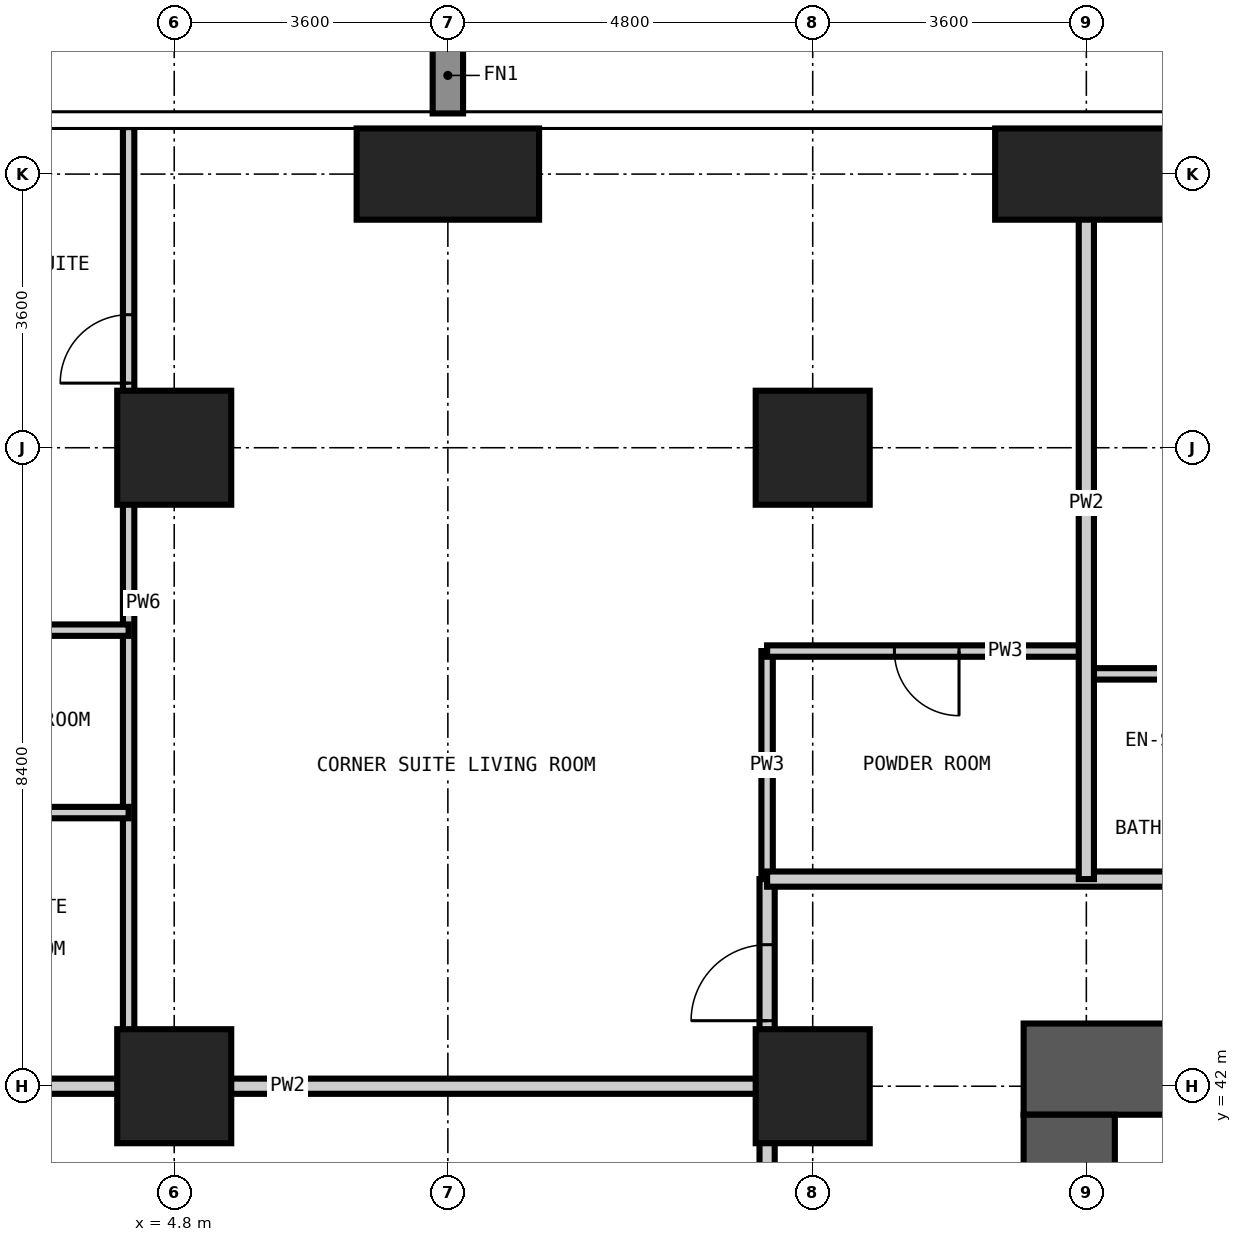
"""IFC4 building model, lengths in metres.
Left out: names, types, materials, properties, quantities, classifications, styles, units other than length and angle.
Written with IfcOpenShell. Run it as: python <this file> out.ifc"""

import sys

from ifc_helpers import new_model, si_unit, direction, frame, frame_2d, origin, origin_2d, place, context, subcontext, project, spatial, rectangle, extrude, element, fill, save


model = new_model("IFC4")
c1 = context("Model", 3, precision=1e-05, world=origin(), true_north=direction((0.0, 1.0)))
c2 = subcontext(c1, "Body", "Model", "MODEL_VIEW")
j1 = project(units=[si_unit("LENGTHUNIT", "METRE"), si_unit("PLANEANGLEUNIT", "RADIAN")], contexts=[c1])
p1 = place(None, origin())
s1 = spatial("IfcSite", under=j1, at=p1, CompositionType="ELEMENT")
p2 = place(p1, origin())
s2 = spatial("IfcBuilding", under=s1, at=p2, CompositionType="ELEMENT")
p3 = place(p2, frame((0.0, 0.0, 111.6)))
s3 = spatial("IfcBuildingStorey", under=s2, at=p3, CompositionType="ELEMENT", Elevation=111.6)
for number, where, z_axis, x_axis in (
    (1, (4.8, 42.0, -0.35), (0.0, 0.0, 1.0), (1.0, 0.0, 0.0)),
    (2, (4.8, 50.4, -0.35), (0.0, 0.0, 1.0), (1.0, 0.0, 0.0)),
):
    element("IfcColumn", number, at=place(p3, frame(where, z_axis=z_axis, x_axis=x_axis)), inside=s3, PredefinedType="COLUMN", context=c2, shape_type="SweptSolid", body=[
        extrude(rectangle(XDim=1.5, YDim=1.5, at=origin_2d()), origin(), (0.0, 0.0, 1.0), 3.6),
    ])
p4 = place(p3, frame((8.4, 54.0, -0.35), z_axis=(0.0, 0.0, 1.0), x_axis=(1.0, 0.0, 0.0)))
e3 = element("IfcColumn", 3, at=p4, inside=s3, PredefinedType="COLUMN", context=c2, shape_type="SweptSolid", body=[
    extrude(rectangle(XDim=2.4, YDim=1.2, at=origin_2d()), origin(), (0.0, 0.0, 1.0), 3.6),
])
for number, where, z_axis, x_axis in (
    (4, (13.2, 42.0, -0.35), (0.0, 0.0, 1.0), (1.0, 0.0, 0.0)),
    (5, (13.2, 50.4, -0.35), (0.0, 0.0, 1.0), (1.0, 0.0, 0.0)),
):
    element("IfcColumn", number, at=place(p3, frame(where, z_axis=z_axis, x_axis=x_axis)), inside=s3, PredefinedType="COLUMN", context=c2, shape_type="SweptSolid", body=[
        extrude(rectangle(XDim=1.5, YDim=1.5, at=origin_2d()), origin(), (0.0, 0.0, 1.0), 3.6),
    ])
p5 = place(p3, frame((16.8, 54.0, -0.35), z_axis=(0.0, 0.0, 1.0), x_axis=(1.0, 0.0, 0.0)))
e6 = element("IfcColumn", 6, at=p5, inside=s3, PredefinedType="COLUMN", context=c2, shape_type="SweptSolid", body=[
    extrude(rectangle(XDim=2.4, YDim=1.2, at=origin_2d()), origin(), (0.0, 0.0, 1.0), 3.6),
])
p6 = place(p3, frame((42.825, 42.225, -0.35), z_axis=(0.0, 0.0, 1.0), x_axis=(-1.0, 0.0, 0.0)))
e7 = element("IfcWall", 7, at=p6, inside=s3, PredefinedType="SHEAR", context=c2, shape_type="SweptSolid", body=[
    extrude(rectangle(XDim=26.85, YDim=1.2, at=frame_2d((13.425, 0.0))), origin(), (0.0, 0.0, 1.0), 3.6),
])
p7 = place(p6, frame((21.325, 0.0, 0.35)))
e8 = element("IfcOpeningElement", 8, at=p7, cuts=e7, PredefinedType="OPENING", context=c2, shape_type="SweptSolid", body=[
    extrude(rectangle(XDim=1.0, YDim=2.1, at=frame_2d((0.5, 1.05))), frame((0.0, 0.61, 0.0), z_axis=(0.0, -1.0, 0.0), x_axis=(1.0, 0.0, 0.0)), (0.0, 0.0, 1.0), 1.22),
])
p8 = place(p6, frame((10.725, 0.0, 0.35)))
e9 = element("IfcOpeningElement", 9, at=p8, cuts=e7, PredefinedType="OPENING", context=c2, shape_type="SweptSolid", body=[
    extrude(rectangle(XDim=1.2, YDim=2.2, at=frame_2d((0.6, 1.1))), frame((0.0, 0.61, 0.0), z_axis=(0.0, -1.0, 0.0), x_axis=(1.0, 0.0, 0.0)), (0.0, 0.0, 1.0), 1.22),
])
p9 = place(p3, frame((16.575, 41.625, -0.35), z_axis=(0.0, 0.0, 1.0), x_axis=(0.0, -1.0, 0.0)))
e10 = element("IfcWall", 10, at=p9, inside=s3, PredefinedType="SHEAR", context=c2, shape_type="SweptSolid", body=[
    extrude(rectangle(XDim=24.45, YDim=1.2, at=frame_2d((12.225, 0.0))), origin(), (0.0, 0.0, 1.0), 3.6),
])
p10 = place(p9, frame((11.325, 0.0, 0.35)))
e11 = element("IfcOpeningElement", 11, at=p10, cuts=e10, PredefinedType="OPENING", context=c2, shape_type="SweptSolid", body=[
    extrude(rectangle(XDim=1.8, YDim=2.2, at=frame_2d((0.9, 1.1))), frame((0.0, 0.61, 0.0), z_axis=(0.0, -1.0, 0.0), x_axis=(1.0, 0.0, 0.0)), (0.0, 0.0, 1.0), 1.22),
])
p11 = place(p9, frame((20.125, 0.0, 0.35)))
e12 = element("IfcOpeningElement", 12, at=p11, cuts=e10, PredefinedType="OPENING", context=c2, shape_type="SweptSolid", body=[
    extrude(rectangle(XDim=1.0, YDim=2.1, at=frame_2d((0.5, 1.05))), frame((0.0, 0.61, 0.0), z_axis=(0.0, -1.0, 0.0), x_axis=(1.0, 0.0, 0.0)), (0.0, 0.0, 1.0), 1.22),
])
p12 = place(p9, frame((5.425, 0.0, 0.35)))
e13 = element("IfcOpeningElement", 13, at=p12, cuts=e10, PredefinedType="OPENING", context=c2, shape_type="SweptSolid", body=[
    extrude(rectangle(XDim=1.0, YDim=2.1, at=frame_2d((0.5, 1.05))), frame((0.0, 0.61, 0.0), z_axis=(0.0, -1.0, 0.0), x_axis=(1.0, 0.0, 0.0)), (0.0, 0.0, 1.0), 1.22),
])
p13 = place(p3, frame((12.6, 44.725, 0.0), z_axis=(0.0, 0.0, 1.0), x_axis=(0.0, 1.0, 0.0)))
e14 = element("IfcWall", 14, at=p13, inside=s3, PredefinedType="PARTITIONING", context=c2, shape_type="SweptSolid", body=[
    extrude(rectangle(XDim=3.0, YDim=0.15, at=frame_2d((1.5, 0.0))), origin(), (0.0, 0.0, 1.0), 3.25),
])
p14 = place(p3, frame((16.8, 47.425, 0.0), z_axis=(0.0, 0.0, 1.0), x_axis=(1.0, 0.0, 0.0)))
e15 = element("IfcWall", 15, at=p14, inside=s3, PredefinedType="PARTITIONING", context=c2, shape_type="SweptSolid", body=[
    extrude(rectangle(XDim=2.4, YDim=0.15, at=frame_2d((1.2, 0.0))), origin(), (0.0, 0.0, 1.0), 3.25),
])
p15 = place(p3, frame((12.6, 47.725, 0.0), z_axis=(0.0, 0.0, 1.0), x_axis=(1.0, 0.0, 0.0)))
e16 = element("IfcWall", 16, at=p15, inside=s3, PredefinedType="PARTITIONING", context=c2, shape_type="SweptSolid", body=[
    extrude(rectangle(XDim=4.2, YDim=0.15, at=frame_2d((2.1, 0.0))), origin(), (0.0, 0.0, 1.0), 3.25),
])
p16 = place(p15, frame((1.675, 0.0, 0.0)))
e17 = element("IfcOpeningElement", 17, at=p16, cuts=e16, PredefinedType="OPENING", context=c2, shape_type="SweptSolid", body=[
    extrude(rectangle(XDim=0.85, YDim=2.1, at=frame_2d((0.425, 1.05))), frame((0.0, 0.085, 0.0), z_axis=(0.0, -1.0, 0.0), x_axis=(1.0, 0.0, 0.0)), (0.0, 0.0, 1.0), 0.17),
])
p17 = place(p3, frame((12.6, 12.875, 0.0), z_axis=(0.0, 0.0, 1.0), x_axis=(0.0, 1.0, 0.0)))
e18 = element("IfcWall", 18, at=p17, inside=s3, PredefinedType="PARTITIONING", context=c2, shape_type="SweptSolid", body=[
    extrude(rectangle(XDim=31.85, YDim=0.2, at=frame_2d((15.925, 0.0))), origin(), (0.0, 0.0, 1.0), 3.25),
])
p18 = place(p17, frame((8.825, 0.0, 0.0)))
e19 = element("IfcOpeningElement", 19, at=p18, cuts=e18, PredefinedType="OPENING", context=c2, shape_type="SweptSolid", body=[
    extrude(rectangle(XDim=1.0, YDim=2.2, at=frame_2d((0.5, 1.1))), frame((0.0, 0.11, 0.0), z_axis=(0.0, -1.0, 0.0), x_axis=(1.0, 0.0, 0.0)), (0.0, 0.0, 1.0), 0.22),
])
p19 = place(p17, frame((17.225, 0.0, 0.0)))
e20 = element("IfcOpeningElement", 20, at=p19, cuts=e18, PredefinedType="OPENING", context=c2, shape_type="SweptSolid", body=[
    extrude(rectangle(XDim=1.0, YDim=2.2, at=frame_2d((0.5, 1.1))), frame((0.0, 0.11, 0.0), z_axis=(0.0, -1.0, 0.0), x_axis=(1.0, 0.0, 0.0)), (0.0, 0.0, 1.0), 0.22),
])
p20 = place(p17, frame((25.625, 0.0, 0.0)))
e21 = element("IfcOpeningElement", 21, at=p20, cuts=e18, PredefinedType="OPENING", context=c2, shape_type="SweptSolid", body=[
    extrude(rectangle(XDim=1.0, YDim=2.2, at=frame_2d((0.5, 1.1))), frame((0.0, 0.11, 0.0), z_axis=(0.0, -1.0, 0.0), x_axis=(1.0, 0.0, 0.0)), (0.0, 0.0, 1.0), 0.22),
])
p21 = place(p17, frame((1.463, 0.0, 0.0)))
e22 = element("IfcOpeningElement", 22, at=p21, cuts=e18, PredefinedType="OPENING", context=c2, shape_type="SweptSolid", body=[
    extrude(rectangle(XDim=1.0, YDim=2.2, at=frame_2d((0.5, 1.1))), frame((0.0, 0.11, 0.0), z_axis=(0.0, -1.0, 0.0), x_axis=(1.0, 0.0, 0.0)), (0.0, 0.0, 1.0), 0.22),
])
p22 = place(p17, frame((29.987, 0.0, 0.0)))
e23 = element("IfcOpeningElement", 23, at=p22, cuts=e18, PredefinedType="OPENING", context=c2, shape_type="SweptSolid", body=[
    extrude(rectangle(XDim=1.0, YDim=2.2, at=frame_2d((0.5, 1.1))), frame((0.0, 0.11, 0.0), z_axis=(0.0, -1.0, 0.0), x_axis=(1.0, 0.0, 0.0)), (0.0, 0.0, 1.0), 0.22),
])
p23 = place(p3, frame((12.6, 44.725, 0.0), z_axis=(0.0, 0.0, 1.0), x_axis=(1.0, 0.0, 0.0)))
e24 = element("IfcWall", 24, at=p23, inside=s3, PredefinedType="PARTITIONING", context=c2, shape_type="SweptSolid", body=[
    extrude(rectangle(XDim=32.725, YDim=0.2, at=frame_2d((16.362, 0.0))), origin(), (0.0, 0.0, 1.0), 3.25),
])
p24 = place(p23, frame((9.1, 0.0, 0.0)))
e25 = element("IfcOpeningElement", 25, at=p24, cuts=e24, PredefinedType="OPENING", context=c2, shape_type="SweptSolid", body=[
    extrude(rectangle(XDim=1.0, YDim=2.2, at=frame_2d((0.5, 1.1))), frame((0.0, 0.11, 0.0), z_axis=(0.0, -1.0, 0.0), x_axis=(1.0, 0.0, 0.0)), (0.0, 0.0, 1.0), 0.22),
])
p25 = place(p23, frame((17.5, 0.0, 0.0)))
e26 = element("IfcOpeningElement", 26, at=p25, cuts=e24, PredefinedType="OPENING", context=c2, shape_type="SweptSolid", body=[
    extrude(rectangle(XDim=1.0, YDim=2.2, at=frame_2d((0.5, 1.1))), frame((0.0, 0.11, 0.0), z_axis=(0.0, -1.0, 0.0), x_axis=(1.0, 0.0, 0.0)), (0.0, 0.0, 1.0), 0.22),
])
p26 = place(p23, frame((25.9, 0.0, 0.0)))
e27 = element("IfcOpeningElement", 27, at=p26, cuts=e24, PredefinedType="OPENING", context=c2, shape_type="SweptSolid", body=[
    extrude(rectangle(XDim=1.0, YDim=2.2, at=frame_2d((0.5, 1.1))), frame((0.0, 0.11, 0.0), z_axis=(0.0, -1.0, 0.0), x_axis=(1.0, 0.0, 0.0)), (0.0, 0.0, 1.0), 0.22),
])
p27 = place(p3, frame((16.8, 44.725, 0.0), z_axis=(0.0, 0.0, 1.0), x_axis=(0.0, 1.0, 0.0)))
e28 = element("IfcWall", 28, at=p27, inside=s3, PredefinedType="PARTITIONING", context=c2, shape_type="SweptSolid", body=[
    extrude(rectangle(XDim=9.893, YDim=0.2, at=frame_2d((4.946, 0.0))), origin(), (0.0, 0.0, 1.0), 3.25),
])
p28 = place(p3, frame((-0.018, 42.0, 0.0), z_axis=(0.0, 0.0, 1.0), x_axis=(1.0, 0.0, 0.0)))
e29 = element("IfcWall", 29, at=p28, inside=s3, PredefinedType="PARTITIONING", context=c2, shape_type="SweptSolid", body=[
    extrude(rectangle(XDim=12.618, YDim=0.2, at=frame_2d((6.309, 0.0))), origin(), (0.0, 0.0, 1.0), 3.25),
])
p29 = place(p3, frame((4.2, 42.0, 0.0), z_axis=(0.0, 0.0, 1.0), x_axis=(0.0, 1.0, 0.0)))
e30 = element("IfcWall", 30, at=p29, inside=s3, PredefinedType="PARTITIONING", context=c2, shape_type="SweptSolid", body=[
    extrude(rectangle(XDim=12.618, YDim=0.15, at=frame_2d((6.309, 0.0))), origin(), (0.0, 0.0, 1.0), 3.25),
])
p30 = place(p29, frame((9.25, 0.0, 0.0)))
e31 = element("IfcOpeningElement", 31, at=p30, cuts=e30, PredefinedType="OPENING", context=c2, shape_type="SweptSolid", body=[
    extrude(rectangle(XDim=0.9, YDim=2.1, at=frame_2d((0.45, 1.05))), frame((0.0, 0.085, 0.0), z_axis=(0.0, -1.0, 0.0), x_axis=(1.0, 0.0, 0.0)), (0.0, 0.0, 1.0), 0.17),
])
p31 = place(p3, frame((1.2, 45.6, 0.0), z_axis=(0.0, 0.0, 1.0), x_axis=(1.0, 0.0, 0.0)))
e32 = element("IfcWall", 32, at=p31, inside=s3, PredefinedType="PARTITIONING", context=c2, shape_type="SweptSolid", body=[
    extrude(rectangle(XDim=3.0, YDim=0.15, at=frame_2d((1.5, 0.0))), origin(), (0.0, 0.0, 1.0), 3.25),
])
p32 = place(p3, frame((1.2, 48.0, 0.0), z_axis=(0.0, 0.0, 1.0), x_axis=(1.0, 0.0, 0.0)))
e33 = element("IfcWall", 33, at=p32, inside=s3, PredefinedType="PARTITIONING", context=c2, shape_type="SweptSolid", body=[
    extrude(rectangle(XDim=3.0, YDim=0.15, at=frame_2d((1.5, 0.0))), origin(), (0.0, 0.0, 1.0), 3.25),
])
p33 = place(p32, frame((1.05, 0.0, 0.0)))
e34 = element("IfcOpeningElement", 34, at=p33, cuts=e33, PredefinedType="OPENING", context=c2, shape_type="SweptSolid", body=[
    extrude(rectangle(XDim=0.9, YDim=2.1, at=frame_2d((0.45, 1.05))), frame((0.0, 0.085, 0.0), z_axis=(0.0, -1.0, 0.0), x_axis=(1.0, 0.0, 0.0)), (0.0, 0.0, 1.0), 0.17),
])
p34 = place(p22, origin())
e35 = element("IfcDoor", 35, at=p34, inside=s3, OperationType="SINGLE_SWING_LEFT", PredefinedType="DOOR", context=c2, shape_type="SweptSolid", body=[
    extrude(rectangle(XDim=1.0, YDim=2.2, at=frame_2d((0.5, 1.1))), frame((0.0, 0.025, 0.0), z_axis=(0.0, -1.0, 0.0), x_axis=(1.0, 0.0, 0.0)), (0.0, 0.0, 1.0), 0.05),
])
fill(e23, e35)
p35 = place(p16, frame((0.85, 0.0, 0.0), z_axis=(0.0, 0.0, 1.0), x_axis=(-1.0, 0.0, 0.0)))
e36 = element("IfcDoor", 36, at=p35, inside=s3, OperationType="SINGLE_SWING_LEFT", PredefinedType="DOOR", context=c2, shape_type="SweptSolid", body=[
    extrude(rectangle(XDim=0.85, YDim=2.1, at=frame_2d((0.425, 1.05))), frame((0.0, 0.025, 0.0), z_axis=(0.0, -1.0, 0.0), x_axis=(1.0, 0.0, 0.0)), (0.0, 0.0, 1.0), 0.05),
])
fill(e17, e36)
p36 = place(p30, origin())
e37 = element("IfcDoor", 37, at=p36, inside=s3, OperationType="SINGLE_SWING_LEFT", PredefinedType="DOOR", context=c2, shape_type="SweptSolid", body=[
    extrude(rectangle(XDim=0.9, YDim=2.1, at=frame_2d((0.45, 1.05))), frame((0.0, 0.025, 0.0), z_axis=(0.0, -1.0, 0.0), x_axis=(1.0, 0.0, 0.0)), (0.0, 0.0, 1.0), 0.05),
])
fill(e31, e37)
save(model, sys.argv[1])
